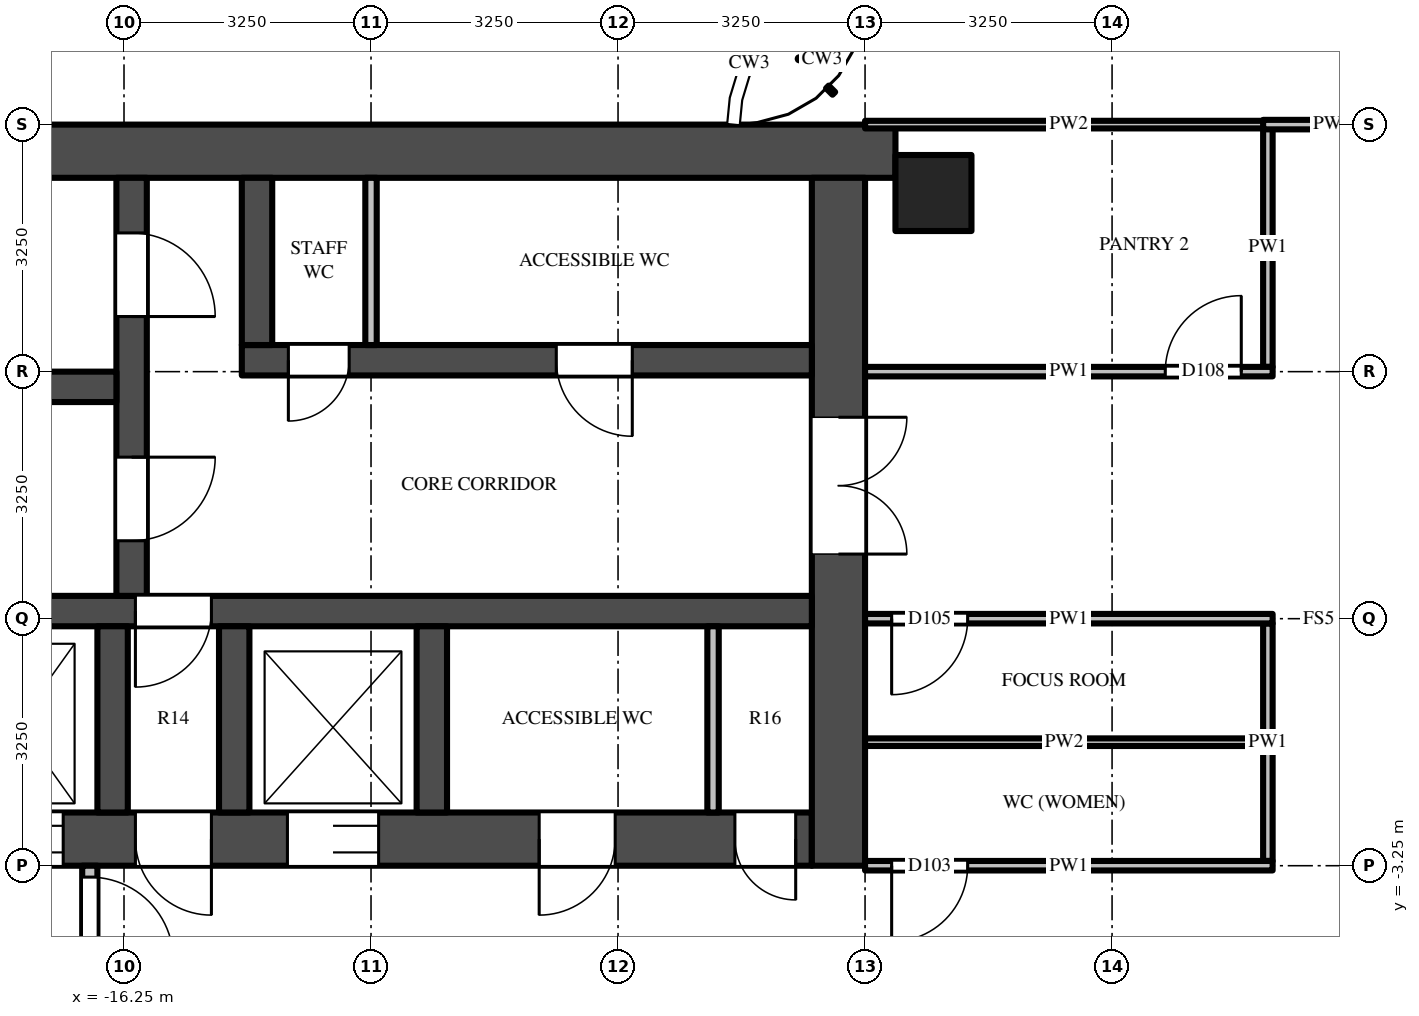
"""IFC4 building model, lengths in metres.
Left out: names, types, materials, properties, quantities, classifications, styles, units other than length and angle.
Written with IfcOpenShell. Run it as: python <this file> out.ifc"""

import sys

from ifc_helpers import new_model, si_unit, direction, frame, frame_2d, origin, origin_2d, place, context, subcontext, project, spatial, rectangle, extrude, source, transform, mapped, element, fill, save


model = new_model("IFC4")
c1 = context("Model", 3, precision=1e-05, world=origin(), true_north=direction((0.0, 1.0)))
c2 = subcontext(c1, "Body", "Model", "MODEL_VIEW")
j1 = project(units=[si_unit("LENGTHUNIT", "METRE"), si_unit("PLANEANGLEUNIT", "RADIAN")], contexts=[c1])
p1 = place(None, origin())
s1 = spatial("IfcSite", under=j1, at=p1, CompositionType="ELEMENT")
p2 = place(p1, origin())
s2 = spatial("IfcBuilding", under=s1, at=p2, CompositionType="ELEMENT")
p3 = place(p2, frame((0.0, 0.0, 279.4)))
s3 = spatial("IfcBuildingStorey", under=s2, at=p3, CompositionType="ELEMENT", Elevation=279.4)
m1 = source(origin(), c2, "Body", "SweptSolid", [
    extrude(rectangle(XDim=1.0, YDim=1.0, at=origin_2d()), origin(), (0.0, 0.0, 1.0), 3.9),
])
p4 = place(p3, frame((-5.6, 5.6, 0.0), z_axis=(0.0, 0.0, 1.0), x_axis=(1.0, 0.0, 0.0)))
e1 = element("IfcColumn", 1, at=p4, inside=s3, PredefinedType="COLUMN", context=c2, shape_type="MappedRepresentation", body=[
    mapped(m1, transform((0.0, 0.0, 0.0))),
])
m2 = source(origin(), c2, "Body", "SweptSolid", [
    extrude(rectangle(XDim=16.65, YDim=0.7, at=frame_2d((8.325, 0.0))), origin(), (0.0, 0.0, 1.0), 3.7),
])
p5 = place(p3, frame((-6.1, 6.15, 0.0), z_axis=(0.0, 0.0, 1.0), x_axis=(-1.0, 0.0, 0.0)))
e2 = element("IfcWall", 2, at=p5, inside=s3, PredefinedType="SHEAR", context=c2, shape_type="MappedRepresentation", body=[
    mapped(m2, transform((0.0, 0.0, 0.0))),
])
m3 = source(origin(), c2, "Body", "SweptSolid", [
    extrude(rectangle(XDim=14.85, YDim=0.7, at=frame_2d((7.425, 0.0))), origin(), (0.0, 0.0, 1.0), 3.7),
])
p6 = place(p3, frame((-7.2, -2.9, 0.0), z_axis=(0.0, 0.0, 1.0), x_axis=(-1.0, 0.0, 0.0)))
e3 = element("IfcWall", 3, at=p6, inside=s3, PredefinedType="SHEAR", context=c2, shape_type="MappedRepresentation", body=[
    mapped(m3, transform((0.0, 0.0, 0.0))),
])
m4 = source(origin(), c2, "Body", "SweptSolid", [
    extrude(rectangle(XDim=1.2, YDim=2.1, at=frame_2d((0.6, 1.05))), frame((0.0, 0.36, 0.0), z_axis=(0.0, -1.0, 0.0), x_axis=(1.0, 0.0, 0.0)), (0.0, 0.0, 1.0), 0.72),
])
p7 = place(p6, frame((5.7, 0.0, 0.0)))
e4 = element("IfcOpeningElement", 4, at=p7, cuts=e3, PredefinedType="OPENING", context=c2, shape_type="MappedRepresentation", body=[
    mapped(m4, transform((0.0, 0.0, 0.0))),
])
m5 = source(origin(), c2, "Body", "SweptSolid", [
    extrude(rectangle(XDim=1.3, YDim=2.1, at=frame_2d((0.65, 1.05))), frame((0.0, 0.36, 0.0), z_axis=(0.0, -1.0, 0.0), x_axis=(1.0, 0.0, 0.0)), (0.0, 0.0, 1.0), 0.72),
])
p8 = place(p6, frame((12.2, 0.0, 0.0)))
e5 = element("IfcOpeningElement", 5, at=p8, cuts=e3, PredefinedType="OPENING", context=c2, shape_type="MappedRepresentation", body=[
    mapped(m5, transform((0.0, 0.0, 0.0))),
])
p9 = place(p6, frame((9.85, 0.0, 0.0)))
e6 = element("IfcOpeningElement", 6, at=p9, cuts=e3, PredefinedType="OPENING", context=c2, shape_type="MappedRepresentation", body=[
    mapped(m4, transform((0.0, 0.0, 0.0))),
])
m6 = source(origin(), c2, "Body", "SweptSolid", [
    extrude(rectangle(XDim=1.0, YDim=2.1, at=frame_2d((0.5, 1.05))), frame((0.0, 0.36, 0.0), z_axis=(0.0, -1.0, 0.0), x_axis=(1.0, 0.0, 0.0)), (0.0, 0.0, 1.0), 0.72),
])
p10 = place(p6, frame((7.9, 0.0, 0.0)))
e7 = element("IfcOpeningElement", 7, at=p10, cuts=e3, PredefinedType="OPENING", context=c2, shape_type="MappedRepresentation", body=[
    mapped(m6, transform((0.0, 0.0, 0.0))),
])
m7 = source(origin(), c2, "Body", "SweptSolid", [
    extrude(rectangle(XDim=0.8, YDim=2.1, at=frame_2d((0.4, 1.05))), frame((0.0, 0.36, 0.0), z_axis=(0.0, -1.0, 0.0), x_axis=(1.0, 0.0, 0.0)), (0.0, 0.0, 1.0), 0.72),
])
p11 = place(p6, frame((0.212, 0.0, 0.0)))
e8 = element("IfcOpeningElement", 8, at=p11, cuts=e3, PredefinedType="OPENING", context=c2, shape_type="MappedRepresentation", body=[
    mapped(m7, transform((0.0, 0.0, 0.0))),
])
p12 = place(p6, frame((2.587, 0.0, 0.0)))
e9 = element("IfcOpeningElement", 9, at=p12, cuts=e3, PredefinedType="OPENING", context=c2, shape_type="MappedRepresentation", body=[
    mapped(m6, transform((0.0, 0.0, 0.0))),
])
m8 = source(origin(), c2, "Body", "SweptSolid", [
    extrude(rectangle(XDim=9.05, YDim=0.7, at=frame_2d((4.525, 0.0))), origin(), (0.0, 0.0, 1.0), 3.7),
])
p13 = place(p3, frame((-6.85, 5.8, 0.0), z_axis=(0.0, 0.0, 1.0), x_axis=(0.0, -1.0, 0.0)))
e10 = element("IfcWall", 10, at=p13, inside=s3, PredefinedType="SHEAR", context=c2, shape_type="MappedRepresentation", body=[
    mapped(m8, transform((0.0, 0.0, 0.0))),
])
m9 = source(origin(), c2, "Body", "SweptSolid", [
    extrude(rectangle(XDim=1.8, YDim=2.1, at=frame_2d((0.9, 1.05))), frame((0.0, 0.36, 0.0), z_axis=(0.0, -1.0, 0.0), x_axis=(1.0, 0.0, 0.0)), (0.0, 0.0, 1.0), 0.72),
])
p14 = place(p13, frame((3.15, 0.0, 0.0)))
e11 = element("IfcOpeningElement", 11, at=p14, cuts=e10, PredefinedType="OPENING", context=c2, shape_type="MappedRepresentation", body=[
    mapped(m9, transform((0.0, 0.0, 0.0))),
])
m10 = source(origin(), c2, "Body", "SweptSolid", [
    extrude(rectangle(XDim=7.5, YDim=0.4, at=frame_2d((3.75, 0.0))), origin(), (0.0, 0.0, 1.0), 3.7),
])
p15 = place(p3, frame((-7.2, 3.4, 0.0), z_axis=(0.0, 0.0, 1.0), x_axis=(-1.0, 0.0, 0.0)))
e12 = element("IfcWall", 12, at=p15, inside=s3, PredefinedType="SHEAR", context=c2, shape_type="MappedRepresentation", body=[
    mapped(m10, transform((0.0, 0.0, 0.0))),
])
m11 = source(origin(), c2, "Body", "SweptSolid", [
    extrude(rectangle(XDim=1.0, YDim=2.1, at=frame_2d((0.5, 1.05))), frame((0.0, 0.21, 0.0), z_axis=(0.0, -1.0, 0.0), x_axis=(1.0, 0.0, 0.0)), (0.0, 0.0, 1.0), 0.42),
])
p16 = place(p15, frame((2.363, 0.0, 0.0)))
e13 = element("IfcOpeningElement", 13, at=p16, cuts=e12, PredefinedType="OPENING", context=c2, shape_type="MappedRepresentation", body=[
    mapped(m11, transform((0.0, 0.0, 0.0))),
])
m12 = source(origin(), c2, "Body", "SweptSolid", [
    extrude(rectangle(XDim=0.8, YDim=2.1, at=frame_2d((0.4, 1.05))), frame((0.0, 0.21, 0.0), z_axis=(0.0, -1.0, 0.0), x_axis=(1.0, 0.0, 0.0)), (0.0, 0.0, 1.0), 0.42),
])
p17 = place(p15, frame((6.087, 0.0, 0.0)))
e14 = element("IfcOpeningElement", 14, at=p17, cuts=e12, PredefinedType="OPENING", context=c2, shape_type="MappedRepresentation", body=[
    mapped(m12, transform((0.0, 0.0, 0.0))),
])
m13 = source(origin(), c2, "Body", "SweptSolid", [
    extrude(rectangle(XDim=14.85, YDim=0.4, at=frame_2d((7.425, 0.0))), origin(), (0.0, 0.0, 1.0), 3.7),
])
p18 = place(p3, frame((-7.2, 0.1, 0.0), z_axis=(0.0, 0.0, 1.0), x_axis=(-1.0, 0.0, 0.0)))
e15 = element("IfcWall", 15, at=p18, inside=s3, PredefinedType="SHEAR", context=c2, shape_type="MappedRepresentation", body=[
    mapped(m13, transform((0.0, 0.0, 0.0))),
])
p19 = place(p18, frame((7.9, 0.0, 0.0)))
e16 = element("IfcOpeningElement", 16, at=p19, cuts=e15, PredefinedType="OPENING", context=c2, shape_type="MappedRepresentation", body=[
    mapped(m11, transform((0.0, 0.0, 0.0))),
])
m14 = source(origin(), c2, "Body", "SweptSolid", [
    extrude(rectangle(XDim=5.5, YDim=0.4, at=frame_2d((2.75, 0.0))), origin(), (0.0, 0.0, 1.0), 3.7),
])
p20 = place(p3, frame((-16.15, 5.8, 0.0), z_axis=(0.0, 0.0, 1.0), x_axis=(0.0, -1.0, 0.0)))
e17 = element("IfcWall", 17, at=p20, inside=s3, PredefinedType="SHEAR", context=c2, shape_type="MappedRepresentation", body=[
    mapped(m14, transform((0.0, 0.0, 0.0))),
])
m15 = source(origin(), c2, "Body", "SweptSolid", [
    extrude(rectangle(XDim=1.1, YDim=2.1, at=frame_2d((0.55, 1.05))), frame((0.0, 0.21, 0.0), z_axis=(0.0, -1.0, 0.0), x_axis=(1.0, 0.0, 0.0)), (0.0, 0.0, 1.0), 0.42),
])
p21 = place(p20, frame((0.725, 0.0, 0.0)))
e18 = element("IfcOpeningElement", 18, at=p21, cuts=e17, PredefinedType="OPENING", context=c2, shape_type="MappedRepresentation", body=[
    mapped(m15, transform((0.0, 0.0, 0.0))),
])
p22 = place(p20, frame((3.675, 0.0, 0.0)))
e19 = element("IfcOpeningElement", 19, at=p22, cuts=e17, PredefinedType="OPENING", context=c2, shape_type="MappedRepresentation", body=[
    mapped(m15, transform((0.0, 0.0, 0.0))),
])
m16 = source(origin(), c2, "Body", "SweptSolid", [
    extrude(rectangle(XDim=5.7, YDim=0.4, at=frame_2d((2.85, 0.0))), origin(), (0.0, 0.0, 1.0), 3.7),
])
p23 = place(p3, frame((-16.35, 3.05, 0.0), z_axis=(0.0, 0.0, 1.0), x_axis=(-1.0, 0.0, 0.0)))
e20 = element("IfcWall", 20, at=p23, inside=s3, PredefinedType="SHEAR", context=c2, shape_type="MappedRepresentation", body=[
    mapped(m16, transform((0.0, 0.0, 0.0))),
])
m17 = source(origin(), c2, "Body", "SweptSolid", [
    extrude(rectangle(XDim=2.2, YDim=0.4, at=frame_2d((1.1, 0.0))), origin(), (0.0, 0.0, 1.0), 3.7),
])
p24 = place(p3, frame((-14.5, 5.8, 0.0), z_axis=(0.0, 0.0, 1.0), x_axis=(0.0, -1.0, 0.0)))
e21 = element("IfcWall", 21, at=p24, inside=s3, PredefinedType="SHEAR", context=c2, shape_type="MappedRepresentation", body=[
    mapped(m17, transform((0.0, 0.0, 0.0))),
])
m18 = source(origin(), c2, "Body", "SweptSolid", [
    extrude(rectangle(XDim=2.45, YDim=0.4, at=frame_2d((1.225, 0.0))), origin(), (0.0, 0.0, 1.0), 3.7),
])
for number, where, z_axis, x_axis in (
    (22, (-12.2, -0.1, 0.0), (0.0, 0.0, 1.0), (0.0, -1.0, 0.0)),
    (23, (-14.8, -0.1, 0.0), (0.0, 0.0, 1.0), (0.0, -1.0, 0.0)),
    (24, (-16.4, -0.1, 0.0), (0.0, 0.0, 1.0), (0.0, -1.0, 0.0)),
):
    element("IfcWall", number, at=place(p3, frame(where, z_axis=z_axis, x_axis=x_axis)), inside=s3, PredefinedType="SHEAR", context=c2, shape_type="MappedRepresentation", body=[
        mapped(m18, transform((0.0, 0.0, 0.0))),
    ])
m19 = source(origin(), c2, "Body", "SweptSolid", [
    extrude(rectangle(XDim=3.25, YDim=0.2, at=frame_2d((1.625, 0.0))), origin(), (0.0, 0.0, 1.0), 3.7),
])
p25 = place(p3, frame((-16.7, -3.25, 0.0), z_axis=(0.0, 0.0, 1.0), x_axis=(0.0, -1.0, 0.0)))
e25 = element("IfcWall", 25, at=p25, inside=s3, PredefinedType="PARTITIONING", context=c2, shape_type="MappedRepresentation", body=[
    mapped(m19, transform((0.0, 0.0, 0.0))),
])
m20 = source(origin(), c2, "Body", "SweptSolid", [
    extrude(rectangle(XDim=1.1, YDim=2.1, at=frame_2d((0.55, 1.05))), frame((0.0, 0.11, 0.0), z_axis=(0.0, -1.0, 0.0), x_axis=(1.0, 0.0, 0.0)), (0.0, 0.0, 1.0), 0.22),
])
p26 = place(p25, frame((0.15, 0.0, 0.0)))
e26 = element("IfcOpeningElement", 26, at=p26, cuts=e25, PredefinedType="OPENING", context=c2, shape_type="MappedRepresentation", body=[
    mapped(m20, transform((0.0, 0.0, 0.0))),
])
m21 = source(origin(), c2, "Body", "SweptSolid", [
    extrude(rectangle(XDim=2.2, YDim=0.15, at=frame_2d((1.1, 0.0))), origin(), (0.0, 0.0, 1.0), 3.7),
])
p27 = place(p3, frame((-13.0, 5.8, 0.0), z_axis=(0.0, 0.0, 1.0), x_axis=(0.0, -1.0, 0.0)))
e27 = element("IfcWall", 27, at=p27, inside=s3, PredefinedType="PARTITIONING", context=c2, shape_type="MappedRepresentation", body=[
    mapped(m21, transform((0.0, 0.0, 0.0))),
])
m22 = source(origin(), c2, "Body", "SweptSolid", [
    extrude(rectangle(XDim=2.45, YDim=0.15, at=frame_2d((1.225, 0.0))), origin(), (0.0, 0.0, 1.0), 3.7),
])
p28 = place(p3, frame((-8.5, -0.1, 0.0), z_axis=(0.0, 0.0, 1.0), x_axis=(0.0, -1.0, 0.0)))
e28 = element("IfcWall", 28, at=p28, inside=s3, PredefinedType="PARTITIONING", context=c2, shape_type="MappedRepresentation", body=[
    mapped(m22, transform((0.0, 0.0, 0.0))),
])
m23 = source(origin(), c2, "Body", "SweptSolid", [
    extrude(rectangle(XDim=3.125, YDim=0.125, at=frame_2d((1.562, 0.0))), origin(), (0.0, 0.0, 1.0), 3.068),
])
p29 = place(p3, frame((-1.2, -0.062, 0.0), z_axis=(0.0, 0.0, 1.0), x_axis=(0.0, -1.0, 0.0)))
e29 = element("IfcWall", 29, at=p29, inside=s3, PredefinedType="PARTITIONING", context=c2, shape_type="MappedRepresentation", body=[
    mapped(m23, transform((0.0, 0.0, 0.0))),
])
m24 = source(origin(), c2, "Body", "SweptSolid", [
    extrude(rectangle(XDim=3.137, YDim=0.125, at=frame_2d((1.569, 0.0))), origin(), (0.0, 0.0, 1.0), 2.997),
])
p30 = place(p3, frame((-1.2, 6.45, 0.0), z_axis=(0.0, 0.0, 1.0), x_axis=(0.0, -1.0, 0.0)))
e30 = element("IfcWall", 30, at=p30, inside=s3, PredefinedType="PARTITIONING", context=c2, shape_type="MappedRepresentation", body=[
    mapped(m24, transform((0.0, 0.0, 0.0))),
])
m25 = source(origin(), c2, "Body", "SweptSolid", [
    extrude(rectangle(XDim=5.363, YDim=0.125, at=frame_2d((2.681, 0.0))), origin(), (0.0, 0.0, 1.0), 2.997),
])
p31 = place(p3, frame((-1.137, -3.25, 0.0), z_axis=(0.0, 0.0, 1.0), x_axis=(-1.0, 0.0, 0.0)))
e31 = element("IfcWall", 31, at=p31, inside=s3, PredefinedType="PARTITIONING", context=c2, shape_type="MappedRepresentation", body=[
    mapped(m25, transform((0.0, 0.0, 0.0))),
])
m26 = source(origin(), c2, "Body", "SweptSolid", [
    extrude(rectangle(XDim=1.0, YDim=2.1, at=frame_2d((0.5, 1.05))), frame((0.0, 0.073, 0.0), z_axis=(0.0, -1.0, 0.0), x_axis=(1.0, 0.0, 0.0)), (0.0, 0.0, 1.0), 0.145),
])
p32 = place(p31, frame((4.012, 0.0, 0.0)))
e32 = element("IfcOpeningElement", 32, at=p32, cuts=e31, PredefinedType="OPENING", context=c2, shape_type="MappedRepresentation", body=[
    mapped(m26, transform((0.0, 0.0, 0.0))),
])
m27 = source(origin(), c2, "Body", "SweptSolid", [
    extrude(rectangle(XDim=5.238, YDim=0.1, at=frame_2d((2.619, 0.0))), origin(), (0.0, 0.0, 1.0), 2.997),
])
p33 = place(p3, frame((-6.5, -1.625, 0.0), z_axis=(0.0, 0.0, 1.0), x_axis=(1.0, 0.0, 0.0)))
e33 = element("IfcWall", 33, at=p33, inside=s3, PredefinedType="PARTITIONING", context=c2, shape_type="MappedRepresentation", body=[
    mapped(m27, transform((0.0, 0.0, 0.0))),
])
p34 = place(p3, frame((-1.137, 0.0, 0.0), z_axis=(0.0, 0.0, 1.0), x_axis=(-1.0, 0.0, 0.0)))
e34 = element("IfcWall", 34, at=p34, inside=s3, PredefinedType="PARTITIONING", context=c2, shape_type="MappedRepresentation", body=[
    mapped(m25, transform((0.0, 0.0, 0.0))),
])
p35 = place(p34, frame((4.012, 0.0, 0.0)))
e35 = element("IfcOpeningElement", 35, at=p35, cuts=e34, PredefinedType="OPENING", context=c2, shape_type="MappedRepresentation", body=[
    mapped(m26, transform((0.0, 0.0, 0.0))),
])
p36 = place(p3, frame((-6.5, 3.25, 0.0), z_axis=(0.0, 0.0, 1.0), x_axis=(1.0, 0.0, 0.0)))
e36 = element("IfcWall", 36, at=p36, inside=s3, PredefinedType="PARTITIONING", context=c2, shape_type="MappedRepresentation", body=[
    mapped(m25, transform((0.0, 0.0, 0.0))),
])
p37 = place(p36, frame((3.95, 0.0, 0.0)))
e37 = element("IfcOpeningElement", 37, at=p37, cuts=e36, PredefinedType="OPENING", context=c2, shape_type="MappedRepresentation", body=[
    mapped(m26, transform((0.0, 0.0, 0.0))),
])
m28 = source(origin(), c2, "Body", "SweptSolid", [
    extrude(rectangle(XDim=5.363, YDim=0.1, at=frame_2d((2.681, 0.0))), origin(), (0.0, 0.0, 1.0), 2.78),
])
p38 = place(p3, frame((-6.5, 6.5, 0.0), z_axis=(0.0, 0.0, 1.0), x_axis=(1.0, 0.0, 0.0)))
e38 = element("IfcWall", 38, at=p38, inside=s3, PredefinedType="PARTITIONING", context=c2, shape_type="MappedRepresentation", body=[
    mapped(m28, transform((0.0, 0.0, 0.0))),
])
m29 = source(origin(), c2, "Body", "SweptSolid", [
    extrude(rectangle(XDim=1.825, YDim=0.125, at=frame_2d((0.913, 0.0))), origin(), (0.0, 0.0, 1.0), 3.7),
])
p39 = place(p3, frame((-1.262, 6.5, 0.0), z_axis=(0.0, 0.0, 1.0), x_axis=(1.0, 0.0, 0.0)))
e39 = element("IfcWall", 39, at=p39, inside=s3, PredefinedType="PARTITIONING", context=c2, shape_type="MappedRepresentation", body=[
    mapped(m29, transform((0.0, 0.0, 0.0))),
])
m30 = source(origin(), c2, "Body", "SweptSolid", [
    extrude(rectangle(XDim=1.2, YDim=2.1, at=frame_2d((0.6, 1.05))), frame((0.0, -0.275, 0.0), z_axis=(0.0, -1.0, 0.0), x_axis=(1.0, 0.0, 0.0)), (0.0, 0.0, 1.0), 0.05),
])
p40 = place(p7, origin())
e40 = element("IfcDoor", 40, at=p40, inside=s3, OperationType="DOUBLE_DOOR_SLIDING", PredefinedType="DOOR", context=c2, shape_type="MappedRepresentation", body=[
    mapped(m30, transform((0.0, 0.0, 0.0))),
])
fill(e4, e40)
p41 = place(p9, origin())
e41 = element("IfcDoor", 41, at=p41, inside=s3, OperationType="DOUBLE_DOOR_SLIDING", PredefinedType="DOOR", context=c2, shape_type="MappedRepresentation", body=[
    mapped(m30, transform((0.0, 0.0, 0.0))),
])
fill(e6, e41)
m31 = source(origin(), c2, "Body", "SweptSolid", [
    extrude(rectangle(XDim=1.8, YDim=2.1, at=frame_2d((0.9, 1.05))), frame((0.0, -0.275, 0.0), z_axis=(0.0, -1.0, 0.0), x_axis=(1.0, 0.0, 0.0)), (0.0, 0.0, 1.0), 0.05),
])
p42 = place(p14, origin())
e42 = element("IfcDoor", 42, at=p42, inside=s3, OperationType="DOUBLE_DOOR_SINGLE_SWING", PredefinedType="DOOR", context=c2, shape_type="MappedRepresentation", body=[
    mapped(m31, transform((0.0, 0.0, 0.0))),
])
fill(e11, e42)
m32 = source(origin(), c2, "Body", "SweptSolid", [
    extrude(rectangle(XDim=1.1, YDim=2.1, at=frame_2d((0.55, 1.05))), frame((0.0, 0.025, 0.0), z_axis=(0.0, -1.0, 0.0), x_axis=(1.0, 0.0, 0.0)), (0.0, 0.0, 1.0), 0.05),
])
p43 = place(p21, origin())
e43 = element("IfcDoor", 43, at=p43, inside=s3, OperationType="SINGLE_SWING_RIGHT", PredefinedType="DOOR", context=c2, shape_type="MappedRepresentation", body=[
    mapped(m32, transform((0.0, 0.0, 0.0))),
])
fill(e18, e43)
p44 = place(p22, origin())
e44 = element("IfcDoor", 44, at=p44, inside=s3, OperationType="SINGLE_SWING_LEFT", PredefinedType="DOOR", context=c2, shape_type="MappedRepresentation", body=[
    mapped(m32, transform((0.0, 0.0, 0.0))),
])
fill(e19, e44)
m33 = source(origin(), c2, "Body", "SweptSolid", [
    extrude(rectangle(XDim=1.0, YDim=2.1, at=frame_2d((0.5, 1.05))), frame((0.0, 0.025, 0.0), z_axis=(0.0, -1.0, 0.0), x_axis=(1.0, 0.0, 0.0)), (0.0, 0.0, 1.0), 0.05),
])
p45 = place(p19, origin())
e45 = element("IfcDoor", 45, at=p45, inside=s3, OperationType="SINGLE_SWING_RIGHT", PredefinedType="DOOR", context=c2, shape_type="MappedRepresentation", body=[
    mapped(m33, transform((0.0, 0.0, 0.0))),
])
fill(e16, e45)
m34 = source(origin(), c2, "Body", "SweptSolid", [
    extrude(rectangle(XDim=1.0, YDim=2.1, at=frame_2d((0.5, 1.05))), frame((0.0, -0.275, 0.0), z_axis=(0.0, -1.0, 0.0), x_axis=(1.0, 0.0, 0.0)), (0.0, 0.0, 1.0), 0.05),
])
p46 = place(p10, origin())
e46 = element("IfcDoor", 46, at=p46, inside=s3, OperationType="SINGLE_SWING_LEFT", PredefinedType="DOOR", context=c2, shape_type="MappedRepresentation", body=[
    mapped(m34, transform((0.0, 0.0, 0.0))),
])
fill(e7, e46)
p47 = place(p26, origin())
e47 = element("IfcDoor", 47, at=p47, inside=s3, OperationType="SINGLE_SWING_RIGHT", PredefinedType="DOOR", context=c2, shape_type="MappedRepresentation", body=[
    mapped(m32, transform((0.0, 0.0, 0.0))),
])
fill(e26, e47)
p48 = place(p16, origin())
e48 = element("IfcDoor", 48, at=p48, inside=s3, OperationType="SINGLE_SWING_LEFT", PredefinedType="DOOR", context=c2, shape_type="MappedRepresentation", body=[
    mapped(m33, transform((0.0, 0.0, 0.0))),
])
fill(e13, e48)
m35 = source(origin(), c2, "Body", "SweptSolid", [
    extrude(rectangle(XDim=0.8, YDim=2.1, at=frame_2d((0.4, 1.05))), frame((0.0, 0.025, 0.0), z_axis=(0.0, -1.0, 0.0), x_axis=(1.0, 0.0, 0.0)), (0.0, 0.0, 1.0), 0.05),
])
p49 = place(p17, origin())
e49 = element("IfcDoor", 49, at=p49, inside=s3, OperationType="SINGLE_SWING_RIGHT", PredefinedType="DOOR", context=c2, shape_type="MappedRepresentation", body=[
    mapped(m35, transform((0.0, 0.0, 0.0))),
])
fill(e14, e49)
m36 = source(origin(), c2, "Body", "SweptSolid", [
    extrude(rectangle(XDim=0.8, YDim=2.1, at=frame_2d((0.4, 1.05))), frame((0.0, -0.275, 0.0), z_axis=(0.0, -1.0, 0.0), x_axis=(1.0, 0.0, 0.0)), (0.0, 0.0, 1.0), 0.05),
])
p50 = place(p11, origin())
e50 = element("IfcDoor", 50, at=p50, inside=s3, OperationType="SINGLE_SWING_LEFT", PredefinedType="DOOR", context=c2, shape_type="MappedRepresentation", body=[
    mapped(m36, transform((0.0, 0.0, 0.0))),
])
fill(e8, e50)
p51 = place(p12, origin())
e51 = element("IfcDoor", 51, at=p51, inside=s3, OperationType="SINGLE_SWING_RIGHT", PredefinedType="DOOR", context=c2, shape_type="MappedRepresentation", body=[
    mapped(m34, transform((0.0, 0.0, 0.0))),
])
fill(e9, e51)
p52 = place(p32, origin())
e52 = element("IfcDoor", 52, at=p52, inside=s3, OperationType="SINGLE_SWING_RIGHT", PredefinedType="DOOR", context=c2, shape_type="MappedRepresentation", body=[
    mapped(m33, transform((0.0, 0.0, 0.0))),
])
fill(e32, e52)
p53 = place(p35, origin())
e53 = element("IfcDoor", 53, at=p53, inside=s3, OperationType="SINGLE_SWING_RIGHT", PredefinedType="DOOR", context=c2, shape_type="MappedRepresentation", body=[
    mapped(m33, transform((0.0, 0.0, 0.0))),
])
fill(e35, e53)
p54 = place(p37, origin())
e54 = element("IfcDoor", 54, at=p54, inside=s3, OperationType="SINGLE_SWING_RIGHT", PredefinedType="DOOR", context=c2, shape_type="MappedRepresentation", body=[
    mapped(m33, transform((0.0, 0.0, 0.0))),
])
fill(e37, e54)
save(model, sys.argv[1])
